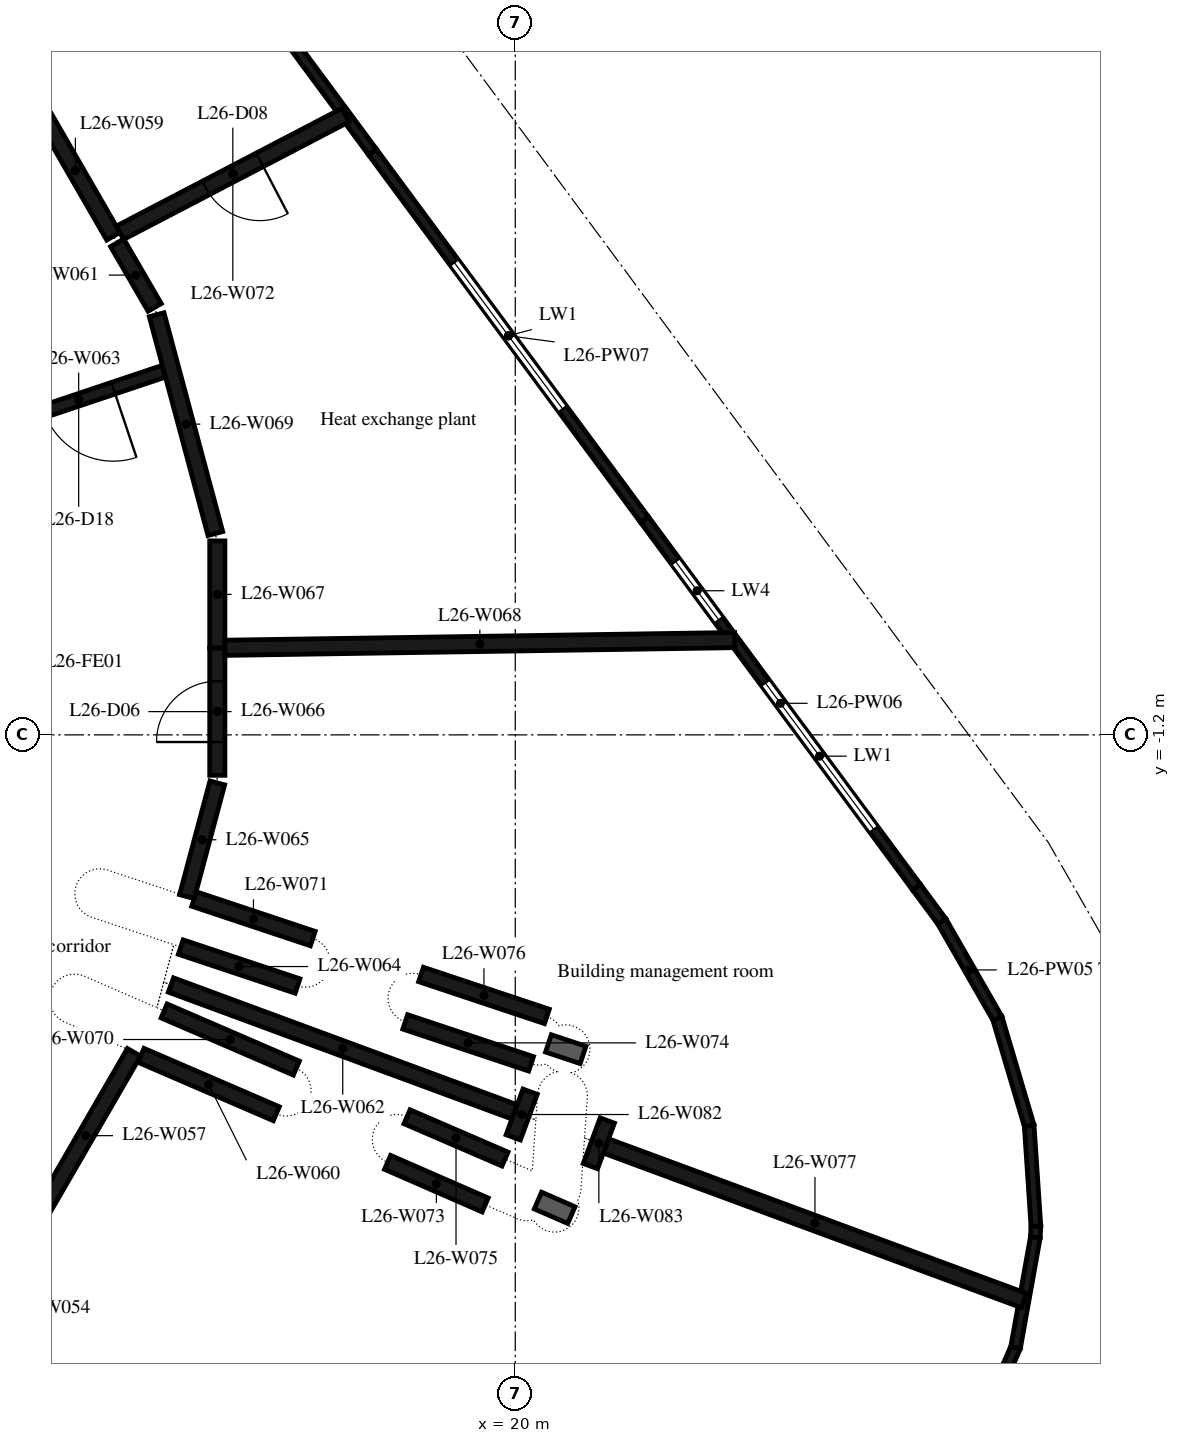
"""IFC4 building model, lengths in metres.
Left out: names, types, materials, properties, quantities, classifications, styles, units other than length and angle.
Written with IfcOpenShell. Run it as: python <this file> out.ifc"""

import sys

from ifc_helpers import new_model, si_unit, direction, frame, frame_2d, origin, place, context, subcontext, project, spatial, rectangle, extrude, element, fill, save


model = new_model("IFC4")
c1 = context("Model", 3, precision=1e-05, world=origin(), true_north=direction((0.0, 1.0)))
c2 = subcontext(c1, "Body", "Model", "MODEL_VIEW")
j1 = project(units=[si_unit("LENGTHUNIT", "METRE"), si_unit("PLANEANGLEUNIT", "RADIAN")], contexts=[c1])
p1 = place(None, origin())
s1 = spatial("IfcSite", under=j1, at=p1, CompositionType="ELEMENT")
p2 = place(p1, origin())
s2 = spatial("IfcBuilding", under=s1, at=p2, CompositionType="ELEMENT")
p3 = place(p2, frame((0.0, 0.0, 108.2)))
s3 = spatial("IfcBuildingStorey", under=s2, at=p3, CompositionType="ELEMENT", Elevation=108.2)
p4 = place(p3, frame((27.493, -12.962, 0.0), z_axis=(0.0, 0.0, 1.0), x_axis=(0.398648829764, 0.917103653099, 0.0)))
e1 = element("IfcWall", 1, at=p4, inside=s3, PredefinedType="STANDARD", context=c2, shape_type="SweptSolid", body=[
    extrude(rectangle(XDim=1.848, YDim=0.16, at=frame_2d((0.924, 0.0))), origin(), (0.0, 0.0, 1.0), 4.75),
])
p5 = place(p3, frame((28.228, -11.276, 0.0), z_axis=(0.0, 0.0, 1.0), x_axis=(0.176417673272, 0.984315398923, 0.0)))
e2 = element("IfcWall", 2, at=p5, inside=s3, PredefinedType="STANDARD", context=c2, shape_type="SweptSolid", body=[
    extrude(rectangle(XDim=1.846, YDim=0.16, at=frame_2d((0.923, 0.0))), origin(), (0.0, 0.0, 1.0), 4.75),
])
p6 = place(p3, frame((28.553, -9.464, 0.0), z_axis=(0.0, 0.0, 1.0), x_axis=(0.049937616944, 0.998752338878, 0.0)))
e3 = element("IfcWall", 3, at=p6, inside=s3, PredefinedType="STANDARD", context=c2, shape_type="SweptSolid", body=[
    extrude(rectangle(XDim=0.186, YDim=0.16, at=frame_2d((0.093, 0.0))), origin(), (0.0, 0.0, 1.0), 4.75),
])
p7 = place(p3, frame((28.562, -9.278, 0.0), z_axis=(0.0, 0.0, 1.0), x_axis=(-0.066870167451, 0.997761685326, 0.0)))
e4 = element("IfcWall", 4, at=p7, inside=s3, PredefinedType="STANDARD", context=c2, shape_type="SweptSolid", body=[
    extrude(rectangle(XDim=1.661, YDim=0.16, at=frame_2d((0.831, 0.0))), origin(), (0.0, 0.0, 1.0), 4.75),
])
p8 = place(p3, frame((28.452, -7.629, 0.0), z_axis=(0.0, 0.0, 1.0), x_axis=(-0.283939871405, 0.958842087847, 0.0)))
e5 = element("IfcWall", 5, at=p8, inside=s3, PredefinedType="STANDARD", context=c2, shape_type="SweptSolid", body=[
    extrude(rectangle(XDim=1.848, YDim=0.16, at=frame_2d((0.924, 0.0))), origin(), (0.0, 0.0, 1.0), 4.75),
])
p9 = place(p3, frame((27.931, -5.866, 0.0), z_axis=(0.0, 0.0, 1.0), x_axis=(-0.497534070267, 0.867444435641, 0.0)))
e6 = element("IfcWall", 6, at=p9, inside=s3, PredefinedType="STANDARD", context=c2, shape_type="SweptSolid", body=[
    extrude(rectangle(XDim=1.846, YDim=0.16, at=frame_2d((0.923, 0.0))), origin(), (0.0, 0.0, 1.0), 4.75),
])
p10 = place(p3, frame((27.016, -4.269, 0.0), z_axis=(0.0, 0.0, 1.0), x_axis=(-0.594771293471, 0.803894961088, 0.0)))
e7 = element("IfcWall", 7, at=p10, inside=s3, PredefinedType="STANDARD", context=c2, shape_type="SweptSolid", body=[
    extrude(rectangle(XDim=0.704, YDim=0.16, at=frame_2d((0.352, 0.0))), origin(), (0.0, 0.0, 1.0), 4.75),
])
p11 = place(p3, frame((26.597, -3.703, 0.0), z_axis=(0.0, 0.0, 1.0), x_axis=(-0.594833773541, 0.803848730704, 0.0)))
e8 = element("IfcWall", 8, at=p11, inside=s3, PredefinedType="STANDARD", context=c2, shape_type="SweptSolid", body=[
    extrude(rectangle(XDim=7.519, YDim=0.16, at=frame_2d((3.759, 0.0))), origin(), (0.0, 0.0, 1.0), 4.75),
])
p12 = place(p11, frame((1.178, 0.0, 1.0)))
e9 = element("IfcOpeningElement", 9, at=p12, cuts=e8, PredefinedType="OPENING", context=c2, shape_type="SweptSolid", body=[
    extrude(rectangle(XDim=3.0, YDim=2.2, at=frame_2d((1.5, 1.1))), frame((0.0, 0.09, 0.0), z_axis=(0.0, -1.0, 0.0), x_axis=(1.0, 0.0, 0.0)), (0.0, 0.0, 1.0), 0.18),
])
p13 = place(p11, frame((5.462, 0.0, 1.0)))
e10 = element("IfcOpeningElement", 10, at=p13, cuts=e8, PredefinedType="OPENING", context=c2, shape_type="SweptSolid", body=[
    extrude(rectangle(XDim=1.2, YDim=2.2, at=frame_2d((0.6, 1.1))), frame((0.0, 0.09, 0.0), z_axis=(0.0, -1.0, 0.0), x_axis=(1.0, 0.0, 0.0)), (0.0, 0.0, 1.0), 0.18),
])
p14 = place(p3, frame((22.125, 2.341, 0.0), z_axis=(0.0, 0.0, 1.0), x_axis=(-0.594818247684, 0.80386021933, 0.0)))
e11 = element("IfcWall", 11, at=p14, inside=s3, PredefinedType="STANDARD", context=c2, shape_type="SweptSolid", body=[
    extrude(rectangle(XDim=7.519, YDim=0.16, at=frame_2d((3.76, 0.0))), origin(), (0.0, 0.0, 1.0), 4.75),
])
p15 = place(p14, frame((2.26, 0.0, 1.0)))
e12 = element("IfcOpeningElement", 12, at=p15, cuts=e11, PredefinedType="OPENING", context=c2, shape_type="SweptSolid", body=[
    extrude(rectangle(XDim=3.0, YDim=2.2, at=frame_2d((1.5, 1.1))), frame((0.0, 0.09, 0.0), z_axis=(0.0, -1.0, 0.0), x_axis=(1.0, 0.0, 0.0)), (0.0, 0.0, 1.0), 0.18),
])
p16 = place(p3, frame((17.652, 8.385, 0.0), z_axis=(0.0, 0.0, 1.0), x_axis=(-0.594833773541, 0.803848730704, 0.0)))
e13 = element("IfcWall", 13, at=p16, inside=s3, PredefinedType="STANDARD", context=c2, shape_type="SweptSolid", body=[
    extrude(rectangle(XDim=7.519, YDim=0.16, at=frame_2d((3.759, 0.0))), origin(), (0.0, 0.0, 1.0), 4.75),
])
p17 = place(p3, frame((12.143, -9.162, 0.0), z_axis=(0.0, 0.0, 1.0), x_axis=(0.501027157918, 0.865431561147, 0.0)))
e14 = element("IfcWall", 14, at=p17, inside=s3, PredefinedType="PARTITIONING", context=c2, shape_type="SweptSolid", body=[
    extrude(rectangle(XDim=3.168, YDim=0.25, at=frame_2d((1.584, 0.0))), origin(), (0.0, 0.0, 1.0), 4.75),
])
p18 = place(p3, frame((13.39, 7.0, 0.0), z_axis=(0.0, 0.0, 1.0), x_axis=(-0.499790202325, 0.86614649665, 0.0)))
e15 = element("IfcWall", 15, at=p18, inside=s3, PredefinedType="PARTITIONING", context=c2, shape_type="SweptSolid", body=[
    extrude(rectangle(XDim=2.496, YDim=0.25, at=frame_2d((1.248, 0.0))), origin(), (0.0, 0.0, 1.0), 4.75),
])
p19 = place(p3, frame((13.845, -6.469, 0.0), z_axis=(0.0, 0.0, 1.0), x_axis=(0.918136491237, -0.396264284863, 0.0)))
e16 = element("IfcWall", 16, at=p19, inside=s3, PredefinedType="PARTITIONING", context=c2, shape_type="SweptSolid", body=[
    extrude(rectangle(XDim=2.424, YDim=0.25, at=frame_2d((1.212, 0.0))), origin(), (0.0, 0.0, 1.0), 4.75),
])
p20 = place(p3, frame((14.07, 5.83, 0.0), z_axis=(0.0, 0.0, 1.0), x_axis=(-0.502547897079, 0.864549368828, 0.0)))
e17 = element("IfcWall", 17, at=p20, inside=s3, PredefinedType="PARTITIONING", context=c2, shape_type="SweptSolid", body=[
    extrude(rectangle(XDim=1.228, YDim=0.25, at=frame_2d((0.614, 0.0))), origin(), (0.0, 0.0, 1.0), 4.75),
])
p21 = place(p3, frame((14.337, -5.313, 0.0), z_axis=(0.0, 0.0, 1.0), x_axis=(0.938077834257, -0.346424561594, 0.0)))
e18 = element("IfcWall", 18, at=p21, inside=s3, PredefinedType="PARTITIONING", context=c2, shape_type="SweptSolid", body=[
    extrude(rectangle(XDim=6.024, YDim=0.25, at=frame_2d((3.012, 0.0))), origin(), (0.0, 0.0, 1.0), 4.75),
])
p22 = place(p3, frame((14.34, 4.82, 0.0), z_axis=(0.0, 0.0, 1.0), x_axis=(-0.94805712629, -0.318100118345, 0.0)))
e19 = element("IfcWall", 19, at=p22, inside=s3, PredefinedType="PARTITIONING", context=c2, shape_type="SweptSolid", body=[
    extrude(rectangle(XDim=3.207, YDim=0.2, at=frame_2d((1.603, 0.0))), origin(), (0.0, 0.0, 1.0), 4.75),
])
p23 = place(p22, frame((1.003, 0.0, 0.0)))
e20 = element("IfcOpeningElement", 20, at=p23, cuts=e19, PredefinedType="OPENING", context=c2, shape_type="SweptSolid", body=[
    extrude(rectangle(XDim=1.2, YDim=2.1, at=frame_2d((0.6, 1.05))), frame((0.0, 0.11, 0.0), z_axis=(0.0, -1.0, 0.0), x_axis=(1.0, 0.0, 0.0)), (0.0, 0.0, 1.0), 0.22),
])
p24 = place(p3, frame((14.499, -4.689, 0.0), z_axis=(0.0, 0.0, 1.0), x_axis=(0.948659187055, -0.316300089814, 0.0)))
e21 = element("IfcWall", 21, at=p24, inside=s3, PredefinedType="PARTITIONING", context=c2, shape_type="SweptSolid", body=[
    extrude(rectangle(XDim=2.025, YDim=0.25, at=frame_2d((1.013, 0.0))), origin(), (0.0, 0.0, 1.0), 4.75),
])
p25 = place(p3, frame((14.6, -3.86, 0.0), z_axis=(0.0, 0.0, 1.0), x_axis=(0.258290571794, 0.966067275361, 0.0)))
e22 = element("IfcWall", 22, at=p25, inside=s3, PredefinedType="PARTITIONING", context=c2, shape_type="SweptSolid", body=[
    extrude(rectangle(XDim=1.936, YDim=0.25, at=frame_2d((0.968, 0.0))), origin(), (0.0, 0.0, 1.0), 4.75),
])
p26 = place(p3, frame((15.1, -1.865, 0.0), z_axis=(0.0, 0.0, 1.0), x_axis=(0.0, 1.0, 0.0)))
e23 = element("IfcWall", 23, at=p26, inside=s3, PredefinedType="PARTITIONING", context=c2, shape_type="SweptSolid", body=[
    extrude(rectangle(XDim=2.095, YDim=0.25, at=frame_2d((1.047, 0.0))), origin(), (0.0, 0.0, 1.0), 4.75),
])
p27 = place(p26, frame((0.548, 0.0, 0.0)))
e24 = element("IfcOpeningElement", 24, at=p27, cuts=e23, PredefinedType="OPENING", context=c2, shape_type="SweptSolid", body=[
    extrude(rectangle(XDim=1.0, YDim=2.1, at=frame_2d((0.5, 1.05))), frame((0.0, 0.135, 0.0), z_axis=(0.0, -1.0, 0.0), x_axis=(1.0, 0.0, 0.0)), (0.0, 0.0, 1.0), 0.27),
])
p28 = place(p3, frame((15.1, 0.23, 0.0), z_axis=(0.0, 0.0, 1.0), x_axis=(0.0, 1.0, 0.0)))
e25 = element("IfcWall", 25, at=p28, inside=s3, PredefinedType="PARTITIONING", context=c2, shape_type="SweptSolid", body=[
    extrude(rectangle(XDim=1.76, YDim=0.25, at=frame_2d((0.88, 0.0))), origin(), (0.0, 0.0, 1.0), 4.75),
])
p29 = place(p3, frame((15.225, 0.232, 0.0), z_axis=(0.0, 0.0, 1.0), x_axis=(0.99988540254, 0.015138751181, 0.0)))
e26 = element("IfcWall", 26, at=p29, inside=s3, PredefinedType="PARTITIONING", context=c2, shape_type="SweptSolid", body=[
    extrude(rectangle(XDim=8.386, YDim=0.25, at=frame_2d((4.193, 0.0))), origin(), (0.0, 0.0, 1.0), 4.75),
])
p30 = place(p3, frame((15.068, 2.111, 0.0), z_axis=(0.0, 0.0, 1.0), x_axis=(-0.259106201401, 0.965848837239, 0.0)))
e27 = element("IfcWall", 27, at=p30, inside=s3, PredefinedType="PARTITIONING", context=c2, shape_type="SweptSolid", body=[
    extrude(rectangle(XDim=3.726, YDim=0.25, at=frame_2d((1.863, 0.0))), origin(), (0.0, 0.0, 1.0), 4.75),
])
p31 = place(p3, frame((16.4, -6.68, 0.0), z_axis=(0.0, 0.0, 1.0), x_axis=(-0.917877323371, 0.396864232756, 0.0)))
e28 = element("IfcWall", 28, at=p31, inside=s3, PredefinedType="PARTITIONING", context=c2, shape_type="SweptSolid", body=[
    extrude(rectangle(XDim=2.37, YDim=0.25, at=frame_2d((1.185, 0.0))), origin(), (0.0, 0.0, 1.0), 4.75),
])
p32 = place(p3, frame((16.67, -4.55, 0.0), z_axis=(0.0, 0.0, 1.0), x_axis=(-0.948659558119, 0.316298976903, 0.0)))
e29 = element("IfcWall", 29, at=p32, inside=s3, PredefinedType="PARTITIONING", context=c2, shape_type="SweptSolid", body=[
    extrude(rectangle(XDim=2.057, YDim=0.25, at=frame_2d((1.029, 0.0))), origin(), (0.0, 0.0, 1.0), 4.75),
])
p33 = place(p3, frame((17.209, 8.993, 0.0), z_axis=(0.0, 0.0, 1.0), x_axis=(-0.886553621963, -0.462625848158, 0.0)))
e30 = element("IfcWall", 30, at=p33, inside=s3, PredefinedType="PARTITIONING", context=c2, shape_type="SweptSolid", body=[
    extrude(rectangle(XDim=4.183, YDim=0.25, at=frame_2d((2.091, 0.0))), origin(), (0.0, 0.0, 1.0), 4.75),
])
p34 = place(p33, frame((1.591, 0.0, 0.0)))
e31 = element("IfcOpeningElement", 31, at=p34, cuts=e30, PredefinedType="OPENING", context=c2, shape_type="SweptSolid", body=[
    extrude(rectangle(XDim=1.0, YDim=2.1, at=frame_2d((0.5, 1.05))), frame((0.0, 0.135, 0.0), z_axis=(0.0, -1.0, 0.0), x_axis=(1.0, 0.0, 0.0)), (0.0, 0.0, 1.0), 0.27),
])
p35 = place(p3, frame((17.9, -8.23, 0.0), z_axis=(0.0, 0.0, 1.0), x_axis=(0.91647060913, -0.400102015242, 0.0)))
e32 = element("IfcWall", 32, at=p35, inside=s3, PredefinedType="PARTITIONING", context=c2, shape_type="SweptSolid", body=[
    extrude(rectangle(XDim=1.751, YDim=0.25, at=frame_2d((0.875, 0.0))), origin(), (0.0, 0.0, 1.0), 4.75),
])
p36 = place(p3, frame((18.19, -5.92, 0.0), z_axis=(0.0, 0.0, 1.0), x_axis=(0.948660918958, -0.316294895376, 0.0)))
e33 = element("IfcWall", 33, at=p36, inside=s3, PredefinedType="PARTITIONING", context=c2, shape_type="SweptSolid", body=[
    extrude(rectangle(XDim=2.182, YDim=0.25, at=frame_2d((1.091, 0.0))), origin(), (0.0, 0.0, 1.0), 4.75),
])
p37 = place(p3, frame((19.831, -8.176, 0.0), z_axis=(0.0, 0.0, 1.0), x_axis=(-0.917967960196, 0.396654539939, 0.0)))
e34 = element("IfcWall", 34, at=p37, inside=s3, PredefinedType="PARTITIONING", context=c2, shape_type="SweptSolid", body=[
    extrude(rectangle(XDim=1.755, YDim=0.25, at=frame_2d((0.877, 0.0))), origin(), (0.0, 0.0, 1.0), 4.75),
])
p38 = place(p3, frame((20.52, -5.83, 0.0), z_axis=(0.0, 0.0, 1.0), x_axis=(-0.948660918958, 0.316294895376, 0.0)))
e35 = element("IfcWall", 35, at=p38, inside=s3, PredefinedType="PARTITIONING", context=c2, shape_type="SweptSolid", body=[
    extrude(rectangle(XDim=2.182, YDim=0.25, at=frame_2d((1.091, 0.0))), origin(), (0.0, 0.0, 1.0), 4.75),
])
p39 = place(p3, frame((21.492, -7.96, 0.0), z_axis=(0.0, 0.0, 1.0), x_axis=(0.937911815422, -0.346873790437, 0.0)))
e36 = element("IfcWall", 36, at=p39, inside=s3, PredefinedType="PARTITIONING", context=c2, shape_type="SweptSolid", body=[
    extrude(rectangle(XDim=7.328, YDim=0.25, at=frame_2d((3.664, 0.0))), origin(), (0.0, 0.0, 1.0), 4.75),
])
p40 = place(p3, frame((19.967, -7.819, 0.0), z_axis=(0.0, 0.0, 1.0), x_axis=(0.346638468149, 0.937998812579, 0.0)))
e37 = element("IfcWall", 37, at=p40, inside=s3, PredefinedType="PARTITIONING", context=c2, shape_type="SweptSolid", body=[
    extrude(rectangle(XDim=0.8, YDim=0.25, at=frame_2d((0.4, 0.0))), origin(), (0.0, 0.0, 1.0), 4.75),
])
p41 = place(p3, frame((21.513, -7.542, 0.0), z_axis=(0.0, 0.0, 1.0), x_axis=(-0.346906900023, -0.937899569632, 0.0)))
e38 = element("IfcWall", 38, at=p41, inside=s3, PredefinedType="PARTITIONING", context=c2, shape_type="SweptSolid", body=[
    extrude(rectangle(XDim=0.8, YDim=0.25, at=frame_2d((0.4, 0.0))), origin(), (0.0, 0.0, 1.0), 4.75),
])
p42 = place(p12, origin())
e39 = element("IfcWindow", 39, at=p42, inside=s3, PartitioningType="SINGLE_PANEL", PredefinedType="WINDOW", context=c2, shape_type="SweptSolid", body=[
    extrude(rectangle(XDim=3.0, YDim=2.2, at=frame_2d((1.5, 1.1))), frame((0.0, 0.03, 0.0), z_axis=(0.0, -1.0, 0.0), x_axis=(1.0, 0.0, 0.0)), (0.0, 0.0, 1.0), 0.06),
])
fill(e9, e39)
p43 = place(p13, origin())
e40 = element("IfcWindow", 40, at=p43, inside=s3, PartitioningType="SINGLE_PANEL", PredefinedType="WINDOW", context=c2, shape_type="SweptSolid", body=[
    extrude(rectangle(XDim=1.2, YDim=2.2, at=frame_2d((0.6, 1.1))), frame((0.0, 0.03, 0.0), z_axis=(0.0, -1.0, 0.0), x_axis=(1.0, 0.0, 0.0)), (0.0, 0.0, 1.0), 0.06),
])
fill(e10, e40)
p44 = place(p15, origin())
e41 = element("IfcWindow", 41, at=p44, inside=s3, PartitioningType="SINGLE_PANEL", PredefinedType="WINDOW", context=c2, shape_type="SweptSolid", body=[
    extrude(rectangle(XDim=3.0, YDim=2.2, at=frame_2d((1.5, 1.1))), frame((0.0, 0.03, 0.0), z_axis=(0.0, -1.0, 0.0), x_axis=(1.0, 0.0, 0.0)), (0.0, 0.0, 1.0), 0.06),
])
fill(e12, e41)
p45 = place(p27, origin())
e42 = element("IfcDoor", 42, at=p45, inside=s3, OperationType="SINGLE_SWING_LEFT", PredefinedType="DOOR", context=c2, shape_type="SweptSolid", body=[
    extrude(rectangle(XDim=1.0, YDim=2.1, at=frame_2d((0.5, 1.05))), frame((0.0, 0.025, 0.0), z_axis=(0.0, -1.0, 0.0), x_axis=(1.0, 0.0, 0.0)), (0.0, 0.0, 1.0), 0.05),
])
fill(e24, e42)
p46 = place(p34, origin())
e43 = element("IfcDoor", 43, at=p46, inside=s3, OperationType="SINGLE_SWING_LEFT", PredefinedType="DOOR", context=c2, shape_type="SweptSolid", body=[
    extrude(rectangle(XDim=1.0, YDim=2.1, at=frame_2d((0.5, 1.05))), frame((0.0, 0.025, 0.0), z_axis=(0.0, -1.0, 0.0), x_axis=(1.0, 0.0, 0.0)), (0.0, 0.0, 1.0), 0.05),
])
fill(e31, e43)
p47 = place(p23, origin())
e44 = element("IfcDoor", 44, at=p47, inside=s3, OperationType="SINGLE_SWING_LEFT", PredefinedType="DOOR", context=c2, shape_type="SweptSolid", body=[
    extrude(rectangle(XDim=1.2, YDim=2.1, at=frame_2d((0.6, 1.05))), frame((0.0, 0.025, 0.0), z_axis=(0.0, -1.0, 0.0), x_axis=(1.0, 0.0, 0.0)), (0.0, 0.0, 1.0), 0.05),
])
fill(e20, e44)
save(model, sys.argv[1])
